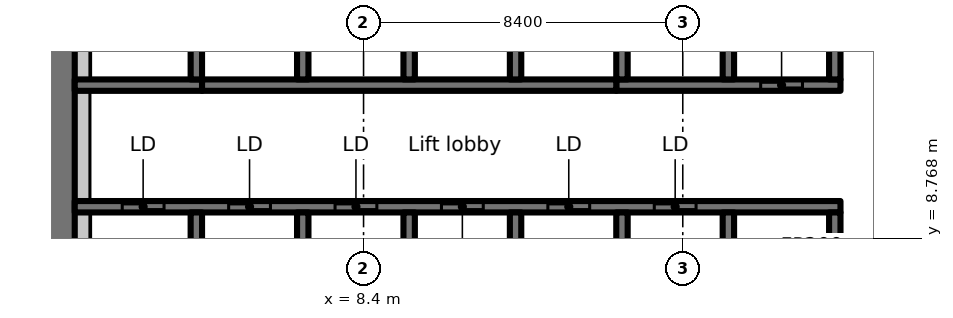
"""IFC4 building model, lengths in metres.
Left out: names, types, materials, properties, quantities, classifications, styles, units other than length and angle.
Written with IfcOpenShell. Run it as: python <this file> out.ifc"""

import sys

from ifc_helpers import new_model, si_unit, direction, frame, frame_2d, origin, place, context, subcontext, project, spatial, rectangle, extrude, element, fill, save


model = new_model("IFC4")
c1 = context("Model", 3, precision=1e-05, world=origin(), true_north=direction((0.0, 1.0)))
c2 = subcontext(c1, "Body", "Model", "MODEL_VIEW")
j1 = project(units=[si_unit("LENGTHUNIT", "METRE"), si_unit("PLANEANGLEUNIT", "RADIAN")], contexts=[c1])
p1 = place(None, origin())
s1 = spatial("IfcSite", under=j1, at=p1, CompositionType="ELEMENT")
p2 = place(p1, origin())
s2 = spatial("IfcBuilding", under=s1, at=p2, CompositionType="ELEMENT")
p3 = place(p2, frame((0.0, 0.0, 152.9)))
s3 = spatial("IfcBuildingStorey", under=s2, at=p3, CompositionType="ELEMENT", Elevation=152.9)
p4 = place(p3, frame((0.4, 7.136, 0.0), z_axis=(0.0, 0.0, 1.0), x_axis=(0.0, 1.0, 0.0)))
e1 = element("IfcWall", 1, at=p4, inside=s3, PredefinedType="SHEAR", context=c2, shape_type="SweptSolid", body=[
    extrude(rectangle(XDim=8.864, YDim=0.8, at=frame_2d((4.432, 0.0))), origin(), (0.0, 0.0, 1.0), 3.3),
])
p5 = place(p3, frame((0.8, 9.6, 0.0), z_axis=(0.0, 0.0, 1.0), x_axis=(1.0, 0.0, 0.0)))
e2 = element("IfcWall", 2, at=p5, inside=s3, PredefinedType="SHEAR", context=c2, shape_type="SweptSolid", body=[
    extrude(rectangle(XDim=20.15, YDim=0.3, at=frame_2d((10.075, 0.0))), origin(), (0.0, 0.0, 1.0), 3.3),
])
p6 = place(p5, frame((1.25, 0.0, 0.0)))
e3 = element("IfcOpeningElement", 3, at=p6, cuts=e2, PredefinedType="OPENING", context=c2, shape_type="SweptSolid", body=[
    extrude(rectangle(XDim=1.1, YDim=2.3, at=frame_2d((0.55, 1.15))), frame((0.0, 0.16, 0.0), z_axis=(0.0, -1.0, 0.0), x_axis=(1.0, 0.0, 0.0)), (0.0, 0.0, 1.0), 0.32),
])
p7 = place(p5, frame((4.05, 0.0, 0.0)))
e4 = element("IfcOpeningElement", 4, at=p7, cuts=e2, PredefinedType="OPENING", context=c2, shape_type="SweptSolid", body=[
    extrude(rectangle(XDim=1.1, YDim=2.3, at=frame_2d((0.55, 1.15))), frame((0.0, 0.16, 0.0), z_axis=(0.0, -1.0, 0.0), x_axis=(1.0, 0.0, 0.0)), (0.0, 0.0, 1.0), 0.32),
])
p8 = place(p5, frame((6.85, 0.0, 0.0)))
e5 = element("IfcOpeningElement", 5, at=p8, cuts=e2, PredefinedType="OPENING", context=c2, shape_type="SweptSolid", body=[
    extrude(rectangle(XDim=1.1, YDim=2.3, at=frame_2d((0.55, 1.15))), frame((0.0, 0.16, 0.0), z_axis=(0.0, -1.0, 0.0), x_axis=(1.0, 0.0, 0.0)), (0.0, 0.0, 1.0), 0.32),
])
p9 = place(p5, frame((9.65, 0.0, 0.0)))
e6 = element("IfcOpeningElement", 6, at=p9, cuts=e2, PredefinedType="OPENING", context=c2, shape_type="SweptSolid", body=[
    extrude(rectangle(XDim=1.1, YDim=2.3, at=frame_2d((0.55, 1.15))), frame((0.0, 0.16, 0.0), z_axis=(0.0, -1.0, 0.0), x_axis=(1.0, 0.0, 0.0)), (0.0, 0.0, 1.0), 0.32),
])
p10 = place(p5, frame((12.45, 0.0, 0.0)))
e7 = element("IfcOpeningElement", 7, at=p10, cuts=e2, PredefinedType="OPENING", context=c2, shape_type="SweptSolid", body=[
    extrude(rectangle(XDim=1.1, YDim=2.3, at=frame_2d((0.55, 1.15))), frame((0.0, 0.16, 0.0), z_axis=(0.0, -1.0, 0.0), x_axis=(1.0, 0.0, 0.0)), (0.0, 0.0, 1.0), 0.32),
])
p11 = place(p5, frame((15.25, 0.0, 0.0)))
e8 = element("IfcOpeningElement", 8, at=p11, cuts=e2, PredefinedType="OPENING", context=c2, shape_type="SweptSolid", body=[
    extrude(rectangle(XDim=1.1, YDim=2.3, at=frame_2d((0.55, 1.15))), frame((0.0, 0.16, 0.0), z_axis=(0.0, -1.0, 0.0), x_axis=(1.0, 0.0, 0.0)), (0.0, 0.0, 1.0), 0.32),
])
for number, where, z_axis, x_axis in (
    (9, (4.0, 7.15, 0.0), (0.0, 0.0, 1.0), (0.0, 1.0, 0.0)),
    (10, (6.8, 7.15, 0.0), (0.0, 0.0, 1.0), (0.0, 1.0, 0.0)),
    (11, (9.6, 7.15, 0.0), (0.0, 0.0, 1.0), (0.0, 1.0, 0.0)),
    (12, (12.4, 7.15, 0.0), (0.0, 0.0, 1.0), (0.0, 1.0, 0.0)),
    (13, (15.2, 7.15, 0.0), (0.0, 0.0, 1.0), (0.0, 1.0, 0.0)),
    (14, (18.0, 7.15, 0.0), (0.0, 0.0, 1.0), (0.0, 1.0, 0.0)),
    (15, (20.8, 7.15, 0.0), (0.0, 0.0, 1.0), (0.0, 1.0, 0.0)),
):
    element("IfcWall", number, at=place(p3, frame(where, z_axis=z_axis, x_axis=x_axis)), inside=s3, PredefinedType="SHEAR", context=c2, shape_type="SweptSolid", body=[
        extrude(rectangle(XDim=2.3, YDim=0.3, at=frame_2d((1.15, 0.0))), origin(), (0.0, 0.0, 1.0), 3.3),
    ])
p12 = place(p3, frame((0.8, 12.8, 0.0), z_axis=(0.0, 0.0, 1.0), x_axis=(1.0, 0.0, 0.0)))
e16 = element("IfcWall", 16, at=p12, inside=s3, PredefinedType="SHEAR", context=c2, shape_type="SweptSolid", body=[
    extrude(rectangle(XDim=3.35, YDim=0.3, at=frame_2d((1.675, 0.0))), origin(), (0.0, 0.0, 1.0), 3.3),
])
p13 = place(p3, frame((4.0, 12.95, 0.0), z_axis=(0.0, 0.0, 1.0), x_axis=(0.0, 1.0, 0.0)))
e17 = element("IfcWall", 17, at=p13, inside=s3, PredefinedType="SHEAR", context=c2, shape_type="SweptSolid", body=[
    extrude(rectangle(XDim=3.05, YDim=0.3, at=frame_2d((1.525, 0.0))), origin(), (0.0, 0.0, 1.0), 3.3),
])
p14 = place(p3, frame((15.05, 12.8, 0.0), z_axis=(0.0, 0.0, 1.0), x_axis=(1.0, 0.0, 0.0)))
e18 = element("IfcWall", 18, at=p14, inside=s3, PredefinedType="SHEAR", context=c2, shape_type="SweptSolid", body=[
    extrude(rectangle(XDim=5.9, YDim=0.3, at=frame_2d((2.95, 0.0))), origin(), (0.0, 0.0, 1.0), 3.3),
])
p15 = place(p14, frame((3.8, 0.0, 0.0)))
e19 = element("IfcOpeningElement", 19, at=p15, cuts=e18, PredefinedType="OPENING", context=c2, shape_type="SweptSolid", body=[
    extrude(rectangle(XDim=1.1, YDim=2.3, at=frame_2d((0.55, 1.15))), frame((0.0, 0.16, 0.0), z_axis=(0.0, -1.0, 0.0), x_axis=(1.0, 0.0, 0.0)), (0.0, 0.0, 1.0), 0.32),
])
for number, where, z_axis, x_axis in (
    (20, (15.2, 12.95, 0.0), (0.0, 0.0, 1.0), (0.0, 1.0, 0.0)),
    (21, (18.0, 12.95, 0.0), (0.0, 0.0, 1.0), (0.0, 1.0, 0.0)),
    (22, (20.8, 12.95, 0.0), (0.0, 0.0, 1.0), (0.0, 1.0, 0.0)),
):
    element("IfcWall", number, at=place(p3, frame(where, z_axis=z_axis, x_axis=x_axis)), inside=s3, PredefinedType="SHEAR", context=c2, shape_type="SweptSolid", body=[
        extrude(rectangle(XDim=3.05, YDim=0.3, at=frame_2d((1.525, 0.0))), origin(), (0.0, 0.0, 1.0), 3.3),
    ])
p16 = place(p3, frame((4.15, 12.8, 0.0), z_axis=(0.0, 0.0, 1.0), x_axis=(1.0, 0.0, 0.0)))
e23 = element("IfcWall", 23, at=p16, inside=s3, PredefinedType="SHEAR", context=c2, shape_type="SweptSolid", body=[
    extrude(rectangle(XDim=10.9, YDim=0.3, at=frame_2d((5.45, 0.0))), origin(), (0.0, 0.0, 1.0), 3.3),
])
for number, where, z_axis, x_axis in (
    (24, (6.8, 12.95, 0.0), (0.0, 0.0, 1.0), (0.0, 1.0, 0.0)),
    (25, (9.6, 12.95, 0.0), (0.0, 0.0, 1.0), (0.0, 1.0, 0.0)),
    (26, (12.4, 12.95, 0.0), (0.0, 0.0, 1.0), (0.0, 1.0, 0.0)),
):
    element("IfcWall", number, at=place(p3, frame(where, z_axis=z_axis, x_axis=x_axis)), inside=s3, PredefinedType="SHEAR", context=c2, shape_type="SweptSolid", body=[
        extrude(rectangle(XDim=3.05, YDim=0.3, at=frame_2d((1.525, 0.0))), origin(), (0.0, 0.0, 1.0), 3.3),
    ])
p17 = place(p3, frame((1.0, 7.15, 0.0), z_axis=(0.0, 0.0, 1.0), x_axis=(0.0, 1.0, 0.0)))
e27 = element("IfcWall", 27, at=p17, inside=s3, PredefinedType="PARTITIONING", context=c2, shape_type="SweptSolid", body=[
    extrude(rectangle(XDim=2.3, YDim=0.4, at=frame_2d((1.15, 0.0))), origin(), (0.0, 0.0, 1.0), 3.3),
])
p18 = place(p3, frame((1.0, 9.75, 0.0), z_axis=(0.0, 0.0, 1.0), x_axis=(0.0, 1.0, 0.0)))
e28 = element("IfcWall", 28, at=p18, inside=s3, PredefinedType="PARTITIONING", context=c2, shape_type="SweptSolid", body=[
    extrude(rectangle(XDim=2.9, YDim=0.4, at=frame_2d((1.45, 0.0))), origin(), (0.0, 0.0, 1.0), 3.3),
])
p19 = place(p3, frame((1.0, 12.95, 0.0), z_axis=(0.0, 0.0, 1.0), x_axis=(0.0, 1.0, 0.0)))
e29 = element("IfcWall", 29, at=p19, inside=s3, PredefinedType="PARTITIONING", context=c2, shape_type="SweptSolid", body=[
    extrude(rectangle(XDim=2.65, YDim=0.4, at=frame_2d((1.325, 0.0))), origin(), (0.0, 0.0, 1.0), 3.3),
])
p20 = place(p6, origin())
e30 = element("IfcDoor", 30, at=p20, inside=s3, OperationType="SLIDING_TO_LEFT", PredefinedType="DOOR", context=c2, shape_type="SweptSolid", body=[
    extrude(rectangle(XDim=1.1, YDim=2.3, at=frame_2d((0.55, 1.15))), frame((0.0, 0.025, 0.0), z_axis=(0.0, -1.0, 0.0), x_axis=(1.0, 0.0, 0.0)), (0.0, 0.0, 1.0), 0.05),
])
fill(e3, e30)
p21 = place(p7, origin())
e31 = element("IfcDoor", 31, at=p21, inside=s3, OperationType="SLIDING_TO_LEFT", PredefinedType="DOOR", context=c2, shape_type="SweptSolid", body=[
    extrude(rectangle(XDim=1.1, YDim=2.3, at=frame_2d((0.55, 1.15))), frame((0.0, 0.025, 0.0), z_axis=(0.0, -1.0, 0.0), x_axis=(1.0, 0.0, 0.0)), (0.0, 0.0, 1.0), 0.05),
])
fill(e4, e31)
p22 = place(p8, origin())
e32 = element("IfcDoor", 32, at=p22, inside=s3, OperationType="SLIDING_TO_LEFT", PredefinedType="DOOR", context=c2, shape_type="SweptSolid", body=[
    extrude(rectangle(XDim=1.1, YDim=2.3, at=frame_2d((0.55, 1.15))), frame((0.0, 0.025, 0.0), z_axis=(0.0, -1.0, 0.0), x_axis=(1.0, 0.0, 0.0)), (0.0, 0.0, 1.0), 0.05),
])
fill(e5, e32)
p23 = place(p9, origin())
e33 = element("IfcDoor", 33, at=p23, inside=s3, OperationType="SLIDING_TO_LEFT", PredefinedType="DOOR", context=c2, shape_type="SweptSolid", body=[
    extrude(rectangle(XDim=1.1, YDim=2.3, at=frame_2d((0.55, 1.15))), frame((0.0, 0.025, 0.0), z_axis=(0.0, -1.0, 0.0), x_axis=(1.0, 0.0, 0.0)), (0.0, 0.0, 1.0), 0.05),
])
fill(e6, e33)
p24 = place(p10, origin())
e34 = element("IfcDoor", 34, at=p24, inside=s3, OperationType="SLIDING_TO_LEFT", PredefinedType="DOOR", context=c2, shape_type="SweptSolid", body=[
    extrude(rectangle(XDim=1.1, YDim=2.3, at=frame_2d((0.55, 1.15))), frame((0.0, 0.025, 0.0), z_axis=(0.0, -1.0, 0.0), x_axis=(1.0, 0.0, 0.0)), (0.0, 0.0, 1.0), 0.05),
])
fill(e7, e34)
p25 = place(p11, origin())
e35 = element("IfcDoor", 35, at=p25, inside=s3, OperationType="SLIDING_TO_LEFT", PredefinedType="DOOR", context=c2, shape_type="SweptSolid", body=[
    extrude(rectangle(XDim=1.1, YDim=2.3, at=frame_2d((0.55, 1.15))), frame((0.0, 0.025, 0.0), z_axis=(0.0, -1.0, 0.0), x_axis=(1.0, 0.0, 0.0)), (0.0, 0.0, 1.0), 0.05),
])
fill(e8, e35)
p26 = place(p15, origin())
e36 = element("IfcDoor", 36, at=p26, inside=s3, OperationType="SLIDING_TO_LEFT", PredefinedType="DOOR", context=c2, shape_type="SweptSolid", body=[
    extrude(rectangle(XDim=1.1, YDim=2.3, at=frame_2d((0.55, 1.15))), frame((0.0, 0.025, 0.0), z_axis=(0.0, -1.0, 0.0), x_axis=(1.0, 0.0, 0.0)), (0.0, 0.0, 1.0), 0.05),
])
fill(e19, e36)
save(model, sys.argv[1])
